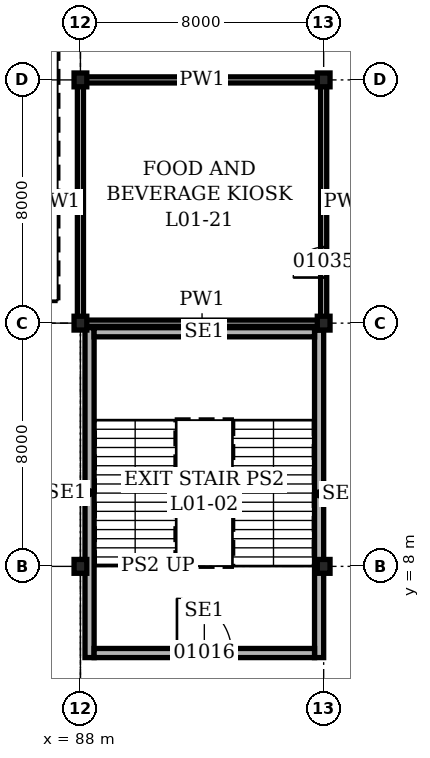
"""IFC4 building model, lengths in metres.
Left out: names, types, materials, properties, quantities, classifications, styles, units other than length and angle.
Written with IfcOpenShell. Run it as: python <this file> out.ifc"""

import sys

from ifc_helpers import new_model, si_unit, direction, frame, frame_2d, origin, origin_2d, place, context, subcontext, project, spatial, rectangle, i_section, extrude, element, fill, save


model = new_model("IFC4")
c1 = context("Model", 3, precision=1e-05, world=origin(), true_north=direction((0.0, 1.0)))
c2 = subcontext(c1, "Body", "Model", "MODEL_VIEW")
j1 = project(units=[si_unit("LENGTHUNIT", "METRE"), si_unit("PLANEANGLEUNIT", "RADIAN")], contexts=[c1])
p1 = place(None, origin())
s1 = spatial("IfcSite", under=j1, at=p1, CompositionType="ELEMENT")
p2 = place(p1, origin())
s2 = spatial("IfcBuilding", under=s1, at=p2, CompositionType="ELEMENT")
p3 = place(p2, frame((0.0, 0.0, 4.9)))
s3 = spatial("IfcBuildingStorey", under=s2, at=p3, CompositionType="ELEMENT", Elevation=4.9)
for number, where, z_axis, x_axis in (
    (1, (88.0, 8.0, 0.0), (0.0, 0.0, 1.0), (1.0, 0.0, 0.0)),
    (2, (88.0, 16.0, 0.0), (0.0, 0.0, 1.0), (1.0, 0.0, 0.0)),
    (3, (88.0, 24.0, 0.0), (0.0, 0.0, 1.0), (1.0, 0.0, 0.0)),
    (4, (96.0, 8.0, 0.0), (0.0, 0.0, 1.0), (1.0, 0.0, 0.0)),
    (5, (96.0, 16.0, 0.0), (0.0, 0.0, 1.0), (1.0, 0.0, 0.0)),
    (6, (96.0, 24.0, 0.0), (0.0, 0.0, 1.0), (1.0, 0.0, 0.0)),
):
    element("IfcColumn", number, at=place(p3, frame(where, z_axis=z_axis, x_axis=x_axis)), inside=s3, PredefinedType="COLUMN", context=c2, shape_type="SweptSolid", body=[
        extrude(i_section(OverallWidth=0.419, OverallDepth=0.455, WebThickness=0.042, FlangeThickness=0.068, at=origin_2d()), origin(), (0.0, 0.0, 1.0), 5.0),
    ])
p4 = place(p3, frame((88.3, 5.0, 0.0), z_axis=(0.0, 0.0, 1.0), x_axis=(0.0, 1.0, 0.0)))
e7 = element("IfcWall", 7, at=p4, inside=s3, PredefinedType="SOLIDWALL", context=c2, shape_type="SweptSolid", body=[
    extrude(rectangle(XDim=10.85, YDim=0.3, at=frame_2d((5.425, 0.0))), origin(), (0.0, 0.0, 1.0), 4.8),
])
p5 = place(p3, frame((95.85, 5.0, 0.0), z_axis=(0.0, 0.0, 1.0), x_axis=(0.0, 1.0, 0.0)))
e8 = element("IfcWall", 8, at=p5, inside=s3, PredefinedType="SOLIDWALL", context=c2, shape_type="SweptSolid", body=[
    extrude(rectangle(XDim=10.773, YDim=0.3, at=frame_2d((5.386, 0.0))), origin(), (0.0, 0.0, 1.0), 4.8),
])
p6 = place(p3, frame((88.45, 5.15, 0.0), z_axis=(0.0, 0.0, 1.0), x_axis=(1.0, 0.0, 0.0)))
e9 = element("IfcWall", 9, at=p6, inside=s3, PredefinedType="SOLIDWALL", context=c2, shape_type="SweptSolid", body=[
    extrude(rectangle(XDim=7.25, YDim=0.3, at=frame_2d((3.625, 0.0))), origin(), (0.0, 0.0, 1.0), 4.8),
])
p7 = place(p6, frame((2.725, 0.0, 0.0)))
e10 = element("IfcOpeningElement", 10, at=p7, cuts=e9, PredefinedType="OPENING", context=c2, shape_type="SweptSolid", body=[
    extrude(rectangle(XDim=1.8, YDim=2.1, at=frame_2d((0.9, 1.05))), frame((0.0, 0.16, 0.0), z_axis=(0.0, -1.0, 0.0), x_axis=(1.0, 0.0, 0.0)), (0.0, 0.0, 1.0), 0.32),
])
p8 = place(p3, frame((88.45, 15.7, 0.0), z_axis=(0.0, 0.0, 1.0), x_axis=(1.0, 0.0, 0.0)))
e11 = element("IfcWall", 11, at=p8, inside=s3, PredefinedType="SOLIDWALL", context=c2, shape_type="SweptSolid", body=[
    extrude(rectangle(XDim=7.25, YDim=0.3, at=frame_2d((3.625, 0.0))), origin(), (0.0, 0.0, 1.0), 4.8),
])
for number, where, z_axis, x_axis in (
    (12, (88.1, 16.0, 0.0), (0.0, 0.0, 1.0), (1.0, 0.0, 0.0)),
    (13, (88.1, 24.0, 0.0), (0.0, 0.0, 1.0), (1.0, 0.0, 0.0)),
    (14, (88.0, 16.1, 0.0), (0.0, 0.0, 1.0), (0.0, 1.0, 0.0)),
):
    element("IfcWall", number, at=place(p3, frame(where, z_axis=z_axis, x_axis=x_axis)), inside=s3, PredefinedType="PARTITIONING", context=c2, shape_type="SweptSolid", body=[
        extrude(rectangle(XDim=7.8, YDim=0.2, at=frame_2d((3.9, 0.0))), origin(), (0.0, 0.0, 1.0), 4.028),
    ])
p9 = place(p3, frame((96.0, 16.1, 0.0), z_axis=(0.0, 0.0, 1.0), x_axis=(0.0, 1.0, 0.0)))
e15 = element("IfcWall", 15, at=p9, inside=s3, PredefinedType="PARTITIONING", context=c2, shape_type="SweptSolid", body=[
    extrude(rectangle(XDim=7.8, YDim=0.2, at=frame_2d((3.9, 0.0))), origin(), (0.0, 0.0, 1.0), 4.028),
])
p10 = place(p9, frame((1.4, 0.0, 0.0)))
e16 = element("IfcOpeningElement", 16, at=p10, cuts=e15, PredefinedType="OPENING", context=c2, shape_type="SweptSolid", body=[
    extrude(rectangle(XDim=1.0, YDim=2.1, at=frame_2d((0.5, 1.05))), frame((0.0, 0.11, 0.0), z_axis=(0.0, -1.0, 0.0), x_axis=(1.0, 0.0, 0.0)), (0.0, 0.0, 1.0), 0.22),
])
p11 = place(p7, origin())
e17 = element("IfcDoor", 17, at=p11, inside=s3, OperationType="DOUBLE_DOOR_SINGLE_SWING", PredefinedType="DOOR", context=c2, shape_type="SweptSolid", body=[
    extrude(rectangle(XDim=1.8, YDim=2.1, at=frame_2d((0.9, 1.05))), frame((0.0, 0.15, 0.0), z_axis=(0.0, -1.0, 0.0), x_axis=(1.0, 0.0, 0.0)), (0.0, 0.0, 1.0), 0.3),
])
fill(e10, e17)
p12 = place(p10, origin())
e18 = element("IfcDoor", 18, at=p12, inside=s3, OperationType="SINGLE_SWING_LEFT", PredefinedType="DOOR", context=c2, shape_type="SweptSolid", body=[
    extrude(rectangle(XDim=1.0, YDim=2.1, at=frame_2d((0.5, 1.05))), frame((0.0, 0.1, 0.0), z_axis=(0.0, -1.0, 0.0), x_axis=(1.0, 0.0, 0.0)), (0.0, 0.0, 1.0), 0.199),
])
fill(e16, e18)
save(model, sys.argv[1])
